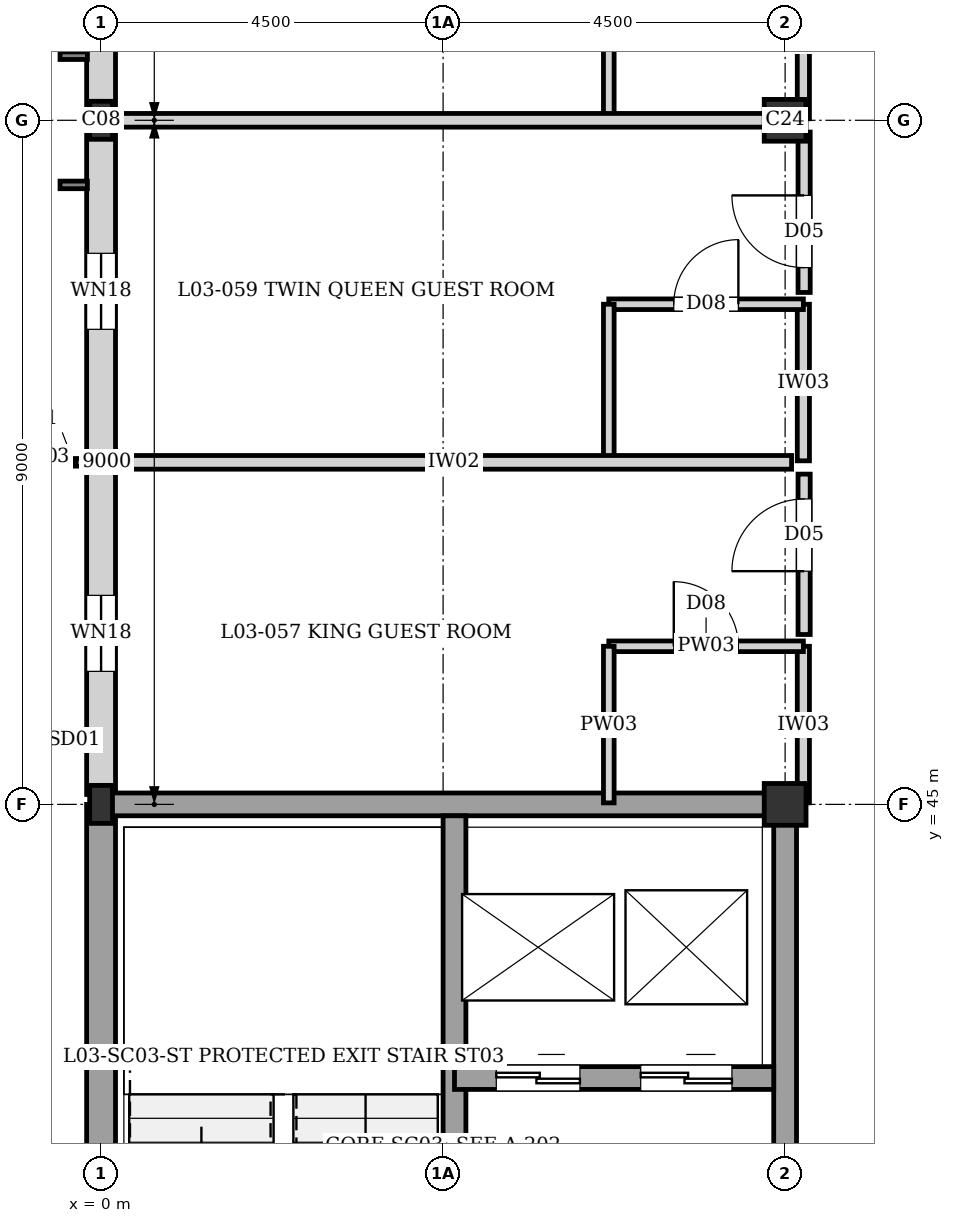
"""IFC4 building model, lengths in metres.
Left out: names, types, materials, properties, quantities, classifications, styles, units other than length and angle.
Written with IfcOpenShell. Run it as: python <this file> out.ifc"""

import sys

from ifc_helpers import new_model, si_unit, direction, frame, frame_2d, origin, origin_2d, place, context, subcontext, project, spatial, rectangle, i_section, extrude, element, fill, save


model = new_model("IFC4")
c1 = context("Model", 3, precision=1e-05, world=origin(), true_north=direction((0.0, 1.0)))
c2 = subcontext(c1, "Body", "Model", "MODEL_VIEW")
j1 = project(units=[si_unit("LENGTHUNIT", "METRE"), si_unit("PLANEANGLEUNIT", "RADIAN")], contexts=[c1])
p1 = place(None, origin())
s1 = spatial("IfcSite", under=j1, at=p1, CompositionType="ELEMENT")
p2 = place(p1, origin())
s2 = spatial("IfcBuilding", under=s1, at=p2, CompositionType="ELEMENT")
p3 = place(p2, frame((0.0, 0.0, 11.52)))
s3 = spatial("IfcBuildingStorey", under=s2, at=p3, CompositionType="ELEMENT", Elevation=11.52)
for number, where, z_axis, x_axis in (
    (1, (0.0, 45.0, 0.0), (0.0, 0.0, 1.0), (1.0, 0.0, 0.0)),
    (2, (0.0, 54.0, 0.0), (0.0, 0.0, 1.0), (1.0, 0.0, 0.0)),
):
    element("IfcColumn", number, at=place(p3, frame(where, z_axis=z_axis, x_axis=x_axis)), inside=s3, PredefinedType="COLUMN", context=c2, shape_type="SweptSolid", body=[
        extrude(i_section(OverallWidth=0.3, OverallDepth=0.5, WebThickness=0.014, FlangeThickness=0.028, at=origin_2d()), origin(), (0.0, 0.0, 1.0), 3.04),
    ])
for number, where, z_axis, x_axis in (
    (3, (9.0, 45.0, 0.0), (0.0, 0.0, 1.0), (1.0, 0.0, 0.0)),
    (4, (9.0, 54.0, 0.0), (0.0, 0.0, 1.0), (1.0, 0.0, 0.0)),
):
    element("IfcColumn", number, at=place(p3, frame(where, z_axis=z_axis, x_axis=x_axis)), inside=s3, PredefinedType="COLUMN", context=c2, shape_type="SweptSolid", body=[
        extrude(rectangle(XDim=0.55, YDim=0.55, at=origin_2d()), origin(), (0.0, 0.0, 1.0), 3.04),
    ])
p4 = place(p3, frame((0.0, 36.0, 0.0), z_axis=(0.0, 0.0, 1.0), x_axis=(0.0, 1.0, 0.0)))
e5 = element("IfcWall", 5, at=p4, inside=s3, PredefinedType="SOLIDWALL", context=c2, shape_type="SweptSolid", body=[
    extrude(rectangle(XDim=9.0, YDim=0.38, at=frame_2d((4.5, 0.0))), origin(), (0.0, 0.0, 1.0), 2.82),
])
p5 = place(p3, frame((0.0, 45.13, 0.0), z_axis=(0.0, 0.0, 1.0), x_axis=(0.0, 1.0, 0.0)))
e6 = element("IfcWall", 6, at=p5, inside=s3, PredefinedType="SOLIDWALL", context=c2, shape_type="SweptSolid", body=[
    extrude(rectangle(XDim=8.87, YDim=0.38, at=frame_2d((4.435, 0.0))), origin(), (0.0, 0.0, 1.0), 2.38),
])
p6 = place(p5, frame((1.62, 0.0, 0.35)))
e7 = element("IfcOpeningElement", 7, at=p6, cuts=e6, PredefinedType="OPENING", context=c2, shape_type="SweptSolid", body=[
    extrude(rectangle(XDim=1.0, YDim=1.6, at=frame_2d((0.5, 0.8))), frame((0.0, 0.2, 0.0), z_axis=(0.0, -1.0, 0.0), x_axis=(1.0, 0.0, 0.0)), (0.0, 0.0, 1.0), 0.4),
])
p7 = place(p5, frame((6.12, 0.0, 0.35)))
e8 = element("IfcOpeningElement", 8, at=p7, cuts=e6, PredefinedType="OPENING", context=c2, shape_type="SweptSolid", body=[
    extrude(rectangle(XDim=1.0, YDim=1.6, at=frame_2d((0.5, 0.8))), frame((0.0, 0.2, 0.0), z_axis=(0.0, -1.0, 0.0), x_axis=(1.0, 0.0, 0.0)), (0.0, 0.0, 1.0), 0.4),
])
p8 = place(p3, frame((0.0, 54.0, 0.0), z_axis=(0.0, 0.0, 1.0), x_axis=(0.0, 1.0, 0.0)))
e9 = element("IfcWall", 9, at=p8, inside=s3, PredefinedType="SOLIDWALL", context=c2, shape_type="SweptSolid", body=[
    extrude(rectangle(XDim=9.0, YDim=0.38, at=frame_2d((4.5, 0.0))), origin(), (0.0, 0.0, 1.0), 2.82),
])
p9 = place(p8, frame((1.75, 0.0, 0.35)))
e10 = element("IfcOpeningElement", 10, at=p9, cuts=e9, PredefinedType="OPENING", context=c2, shape_type="SweptSolid", body=[
    extrude(rectangle(XDim=1.0, YDim=1.6, at=frame_2d((0.5, 0.8))), frame((0.0, 0.2, 0.0), z_axis=(0.0, -1.0, 0.0), x_axis=(1.0, 0.0, 0.0)), (0.0, 0.0, 1.0), 0.4),
])
p10 = place(p8, frame((6.25, 0.0, 0.35)))
e11 = element("IfcOpeningElement", 11, at=p10, cuts=e9, PredefinedType="OPENING", context=c2, shape_type="SweptSolid", body=[
    extrude(rectangle(XDim=1.0, YDim=1.6, at=frame_2d((0.5, 0.8))), frame((0.0, 0.2, 0.0), z_axis=(0.0, -1.0, 0.0), x_axis=(1.0, 0.0, 0.0)), (0.0, 0.0, 1.0), 0.4),
])
p11 = place(p3, frame((9.0, 36.0, 0.0), z_axis=(0.0, 0.0, 1.0), x_axis=(0.0, 1.0, 0.0)))
e12 = element("IfcWall", 12, at=p11, inside=s3, PredefinedType="SHEAR", context=c2, shape_type="SweptSolid", body=[
    extrude(rectangle(XDim=9.0, YDim=0.3, at=frame_2d((4.5, 0.0))), origin(), (0.0, 0.0, 1.0), 2.82),
])
p12 = place(p11, frame((2.05, 0.0, 0.0)))
e13 = element("IfcOpeningElement", 13, at=p12, cuts=e12, PredefinedType="OPENING", context=c2, shape_type="SweptSolid", body=[
    extrude(rectangle(XDim=1.4, YDim=2.02, at=frame_2d((0.7, 1.01))), frame((0.0, 0.16, 0.0), z_axis=(0.0, -1.0, 0.0), x_axis=(1.0, 0.0, 0.0)), (0.0, 0.0, 1.0), 0.32),
])
p13 = place(p3, frame((0.0, 45.0, 0.0), z_axis=(0.0, 0.0, 1.0), x_axis=(1.0, 0.0, 0.0)))
e14 = element("IfcWall", 14, at=p13, inside=s3, PredefinedType="SHEAR", context=c2, shape_type="SweptSolid", body=[
    extrude(rectangle(XDim=9.0, YDim=0.3, at=frame_2d((4.5, 0.0))), origin(), (0.0, 0.0, 1.0), 2.82),
])
p14 = place(p3, frame((4.65, 36.15, 0.0), z_axis=(0.0, 0.0, 1.0), x_axis=(0.0, 1.0, 0.0)))
e15 = element("IfcWall", 15, at=p14, inside=s3, PredefinedType="SHEAR", context=c2, shape_type="SweptSolid", body=[
    extrude(rectangle(XDim=8.7, YDim=0.3, at=frame_2d((4.35, 0.0))), origin(), (0.0, 0.0, 1.0), 2.82),
])
p15 = place(p14, frame((0.35, 0.0, 0.0)))
e16 = element("IfcOpeningElement", 16, at=p15, cuts=e15, PredefinedType="OPENING", context=c2, shape_type="SweptSolid", body=[
    extrude(rectangle(XDim=1.4, YDim=2.02, at=frame_2d((0.7, 1.01))), frame((0.0, 0.16, 0.0), z_axis=(0.0, -1.0, 0.0), x_axis=(1.0, 0.0, 0.0)), (0.0, 0.0, 1.0), 0.32),
])
p16 = place(p3, frame((4.65, 41.4, 0.0), z_axis=(0.0, 0.0, 1.0), x_axis=(1.0, 0.0, 0.0)))
e17 = element("IfcWall", 17, at=p16, inside=s3, PredefinedType="SHEAR", context=c2, shape_type="SweptSolid", body=[
    extrude(rectangle(XDim=4.2, YDim=0.3, at=frame_2d((2.1, 0.0))), origin(), (0.0, 0.0, 1.0), 2.82),
])
p17 = place(p16, frame((0.55, 0.0, 0.0)))
e18 = element("IfcOpeningElement", 18, at=p17, cuts=e17, PredefinedType="OPENING", context=c2, shape_type="SweptSolid", body=[
    extrude(rectangle(XDim=1.1, YDim=2.1, at=frame_2d((0.55, 1.05))), frame((0.0, 0.16, 0.0), z_axis=(0.0, -1.0, 0.0), x_axis=(1.0, 0.0, 0.0)), (0.0, 0.0, 1.0), 0.32),
])
p18 = place(p16, frame((2.45, 0.0, 0.0)))
e19 = element("IfcOpeningElement", 19, at=p18, cuts=e17, PredefinedType="OPENING", context=c2, shape_type="SweptSolid", body=[
    extrude(rectangle(XDim=1.2, YDim=2.2, at=frame_2d((0.6, 1.1))), frame((0.0, 0.16, 0.0), z_axis=(0.0, -1.0, 0.0), x_axis=(1.0, 0.0, 0.0)), (0.0, 0.0, 1.0), 0.32),
])
p19 = place(p3, frame((9.24, 45.02, 0.0), z_axis=(0.0, 0.0, 1.0), x_axis=(0.0, 1.0, 0.0)))
e20 = element("IfcWall", 20, at=p19, inside=s3, PredefinedType="PARTITIONING", context=c2, shape_type="SweptSolid", body=[
    extrude(rectangle(XDim=2.06, YDim=0.16, at=frame_2d((1.03, 0.0))), origin(), (0.0, 0.0, 1.0), 2.82),
])
p20 = place(p3, frame((6.68, 47.08, 0.0), z_axis=(0.0, 0.0, 1.0), x_axis=(1.0, 0.0, 0.0)))
e21 = element("IfcWall", 21, at=p20, inside=s3, PredefinedType="PLUMBINGWALL", context=c2, shape_type="SweptSolid", body=[
    extrude(rectangle(XDim=2.56, YDim=0.14, at=frame_2d((1.28, 0.0))), origin(), (0.0, 0.0, 1.0), 2.82),
])
p21 = place(p20, frame((0.855, 0.0, 0.0)))
e22 = element("IfcOpeningElement", 22, at=p21, cuts=e21, PredefinedType="OPENING", context=c2, shape_type="SweptSolid", body=[
    extrude(rectangle(XDim=0.85, YDim=2.04, at=frame_2d((0.425, 1.02))), frame((0.0, 0.08, 0.0), z_axis=(0.0, -1.0, 0.0), x_axis=(1.0, 0.0, 0.0)), (0.0, 0.0, 1.0), 0.16),
])
p22 = place(p3, frame((6.68, 45.02, 0.0), z_axis=(0.0, 0.0, 1.0), x_axis=(0.0, 1.0, 0.0)))
e23 = element("IfcWall", 23, at=p22, inside=s3, PredefinedType="PLUMBINGWALL", context=c2, shape_type="SweptSolid", body=[
    extrude(rectangle(XDim=2.06, YDim=0.14, at=frame_2d((1.03, 0.0))), origin(), (0.0, 0.0, 1.0), 2.82),
])
p23 = place(p3, frame((9.24, 49.52, 0.0), z_axis=(0.0, 0.0, 1.0), x_axis=(0.0, 1.0, 0.0)))
e24 = element("IfcWall", 24, at=p23, inside=s3, PredefinedType="PARTITIONING", context=c2, shape_type="SweptSolid", body=[
    extrude(rectangle(XDim=2.06, YDim=0.16, at=frame_2d((1.03, 0.0))), origin(), (0.0, 0.0, 1.0), 2.82),
])
p24 = place(p3, frame((6.68, 51.58, 0.0), z_axis=(0.0, 0.0, 1.0), x_axis=(1.0, 0.0, 0.0)))
e25 = element("IfcWall", 25, at=p24, inside=s3, PredefinedType="PLUMBINGWALL", context=c2, shape_type="SweptSolid", body=[
    extrude(rectangle(XDim=2.56, YDim=0.14, at=frame_2d((1.28, 0.0))), origin(), (0.0, 0.0, 1.0), 2.82),
])
p25 = place(p24, frame((0.855, 0.0, 0.0)))
e26 = element("IfcOpeningElement", 26, at=p25, cuts=e25, PredefinedType="OPENING", context=c2, shape_type="SweptSolid", body=[
    extrude(rectangle(XDim=0.85, YDim=2.04, at=frame_2d((0.425, 1.02))), frame((0.0, 0.08, 0.0), z_axis=(0.0, -1.0, 0.0), x_axis=(1.0, 0.0, 0.0)), (0.0, 0.0, 1.0), 0.16),
])
p26 = place(p3, frame((6.68, 49.52, 0.0), z_axis=(0.0, 0.0, 1.0), x_axis=(0.0, 1.0, 0.0)))
e27 = element("IfcWall", 27, at=p26, inside=s3, PredefinedType="PLUMBINGWALL", context=c2, shape_type="SweptSolid", body=[
    extrude(rectangle(XDim=2.06, YDim=0.14, at=frame_2d((1.03, 0.0))), origin(), (0.0, 0.0, 1.0), 2.82),
])
p27 = place(p3, frame((9.24, 54.02, 0.0), z_axis=(0.0, 0.0, 1.0), x_axis=(0.0, 1.0, 0.0)))
e28 = element("IfcWall", 28, at=p27, inside=s3, PredefinedType="PARTITIONING", context=c2, shape_type="SweptSolid", body=[
    extrude(rectangle(XDim=2.06, YDim=0.16, at=frame_2d((1.03, 0.0))), origin(), (0.0, 0.0, 1.0), 2.82),
])
p28 = place(p3, frame((6.68, 54.02, 0.0), z_axis=(0.0, 0.0, 1.0), x_axis=(0.0, 1.0, 0.0)))
e29 = element("IfcWall", 29, at=p28, inside=s3, PredefinedType="PLUMBINGWALL", context=c2, shape_type="SweptSolid", body=[
    extrude(rectangle(XDim=2.06, YDim=0.14, at=frame_2d((1.03, 0.0))), origin(), (0.0, 0.0, 1.0), 2.82),
])
p29 = place(p3, frame((0.195, 49.5, 0.0), z_axis=(0.0, 0.0, 1.0), x_axis=(1.0, 0.0, 0.0)))
e30 = element("IfcWall", 30, at=p29, inside=s3, PredefinedType="PARTITIONING", context=c2, shape_type="SweptSolid", body=[
    extrude(rectangle(XDim=8.89, YDim=0.18, at=frame_2d((4.445, 0.0))), origin(), (0.0, 0.0, 1.0), 2.82),
])
p30 = place(p3, frame((0.195, 54.0, 0.0), z_axis=(0.0, 0.0, 1.0), x_axis=(1.0, 0.0, 0.0)))
e31 = element("IfcWall", 31, at=p30, inside=s3, PredefinedType="PARTITIONING", context=c2, shape_type="SweptSolid", body=[
    extrude(rectangle(XDim=8.89, YDim=0.18, at=frame_2d((4.445, 0.0))), origin(), (0.0, 0.0, 1.0), 2.29),
])
p31 = place(p3, frame((9.25, 47.235, 0.0), z_axis=(0.0, 0.0, 1.0), x_axis=(0.0, 1.0, 0.0)))
e32 = element("IfcWall", 32, at=p31, inside=s3, PredefinedType="PARTITIONING", context=c2, shape_type="SweptSolid", body=[
    extrude(rectangle(XDim=2.11, YDim=0.16, at=frame_2d((1.055, 0.0))), origin(), (0.0, 0.0, 1.0), 2.82),
])
p32 = place(p31, frame((0.833, 0.0, 0.0)))
e33 = element("IfcOpeningElement", 33, at=p32, cuts=e32, PredefinedType="OPENING", context=c2, shape_type="SweptSolid", body=[
    extrude(rectangle(XDim=0.95, YDim=2.15, at=frame_2d((0.475, 1.075))), frame((0.0, 0.09, 0.0), z_axis=(0.0, -1.0, 0.0), x_axis=(1.0, 0.0, 0.0)), (0.0, 0.0, 1.0), 0.18),
])
p33 = place(p3, frame((9.25, 51.735, 0.0), z_axis=(0.0, 0.0, 1.0), x_axis=(0.0, 1.0, 0.0)))
e34 = element("IfcWall", 34, at=p33, inside=s3, PredefinedType="PARTITIONING", context=c2, shape_type="SweptSolid", body=[
    extrude(rectangle(XDim=2.11, YDim=0.16, at=frame_2d((1.055, 0.0))), origin(), (0.0, 0.0, 1.0), 2.82),
])
p34 = place(p33, frame((0.327, 0.0, 0.0)))
e35 = element("IfcOpeningElement", 35, at=p34, cuts=e34, PredefinedType="OPENING", context=c2, shape_type="SweptSolid", body=[
    extrude(rectangle(XDim=0.95, YDim=2.15, at=frame_2d((0.475, 1.075))), frame((0.0, 0.09, 0.0), z_axis=(0.0, -1.0, 0.0), x_axis=(1.0, 0.0, 0.0)), (0.0, 0.0, 1.0), 0.18),
])
p35 = place(p6, origin())
e36 = element("IfcWindow", 36, at=p35, inside=s3, PartitioningType="SINGLE_PANEL", PredefinedType="WINDOW", context=c2, shape_type="SweptSolid", body=[
    extrude(rectangle(XDim=1.0, YDim=1.6, at=frame_2d((0.5, 0.8))), frame((0.0, 0.03, 0.0), z_axis=(0.0, -1.0, 0.0), x_axis=(1.0, 0.0, 0.0)), (0.0, 0.0, 1.0), 0.06),
])
fill(e7, e36)
p36 = place(p7, origin())
e37 = element("IfcWindow", 37, at=p36, inside=s3, PartitioningType="SINGLE_PANEL", PredefinedType="WINDOW", context=c2, shape_type="SweptSolid", body=[
    extrude(rectangle(XDim=1.0, YDim=1.6, at=frame_2d((0.5, 0.8))), frame((0.0, 0.03, 0.0), z_axis=(0.0, -1.0, 0.0), x_axis=(1.0, 0.0, 0.0)), (0.0, 0.0, 1.0), 0.06),
])
fill(e8, e37)
p37 = place(p17, origin())
e38 = element("IfcDoor", 38, at=p37, inside=s3, OperationType="DOUBLE_DOOR_SLIDING", PredefinedType="DOOR", context=c2, shape_type="SweptSolid", body=[
    extrude(rectangle(XDim=1.1, YDim=2.1, at=frame_2d((0.55, 1.05))), frame((0.0, 0.025, 0.0), z_axis=(0.0, -1.0, 0.0), x_axis=(1.0, 0.0, 0.0)), (0.0, 0.0, 1.0), 0.05),
])
fill(e18, e38)
p38 = place(p18, origin())
e39 = element("IfcDoor", 39, at=p38, inside=s3, OperationType="DOUBLE_DOOR_SLIDING", PredefinedType="DOOR", context=c2, shape_type="SweptSolid", body=[
    extrude(rectangle(XDim=1.2, YDim=2.2, at=frame_2d((0.6, 1.1))), frame((0.0, 0.025, 0.0), z_axis=(0.0, -1.0, 0.0), x_axis=(1.0, 0.0, 0.0)), (0.0, 0.0, 1.0), 0.05),
])
fill(e19, e39)
p39 = place(p21, origin())
e40 = element("IfcDoor", 40, at=p39, inside=s3, OperationType="SINGLE_SWING_LEFT", PredefinedType="DOOR", context=c2, shape_type="SweptSolid", body=[
    extrude(rectangle(XDim=0.85, YDim=2.04, at=frame_2d((0.425, 1.02))), frame((0.0, 0.025, 0.0), z_axis=(0.0, -1.0, 0.0), x_axis=(1.0, 0.0, 0.0)), (0.0, 0.0, 1.0), 0.05),
])
fill(e22, e40)
p40 = place(p25, origin())
e41 = element("IfcDoor", 41, at=p40, inside=s3, OperationType="SINGLE_SWING_RIGHT", PredefinedType="DOOR", context=c2, shape_type="SweptSolid", body=[
    extrude(rectangle(XDim=0.85, YDim=2.04, at=frame_2d((0.425, 1.02))), frame((0.0, 0.025, 0.0), z_axis=(0.0, -1.0, 0.0), x_axis=(1.0, 0.0, 0.0)), (0.0, 0.0, 1.0), 0.05),
])
fill(e26, e41)
p41 = place(p32, origin())
e42 = element("IfcDoor", 42, at=p41, inside=s3, OperationType="SINGLE_SWING_LEFT", PredefinedType="DOOR", context=c2, shape_type="SweptSolid", body=[
    extrude(rectangle(XDim=0.95, YDim=2.15, at=frame_2d((0.475, 1.075))), frame((0.0, 0.025, 0.0), z_axis=(0.0, -1.0, 0.0), x_axis=(1.0, 0.0, 0.0)), (0.0, 0.0, 1.0), 0.05),
])
fill(e33, e42)
p42 = place(p34, origin())
e43 = element("IfcDoor", 43, at=p42, inside=s3, OperationType="SINGLE_SWING_RIGHT", PredefinedType="DOOR", context=c2, shape_type="SweptSolid", body=[
    extrude(rectangle(XDim=0.95, YDim=2.15, at=frame_2d((0.475, 1.075))), frame((0.0, 0.025, 0.0), z_axis=(0.0, -1.0, 0.0), x_axis=(1.0, 0.0, 0.0)), (0.0, 0.0, 1.0), 0.05),
])
fill(e35, e43)
save(model, sys.argv[1])
